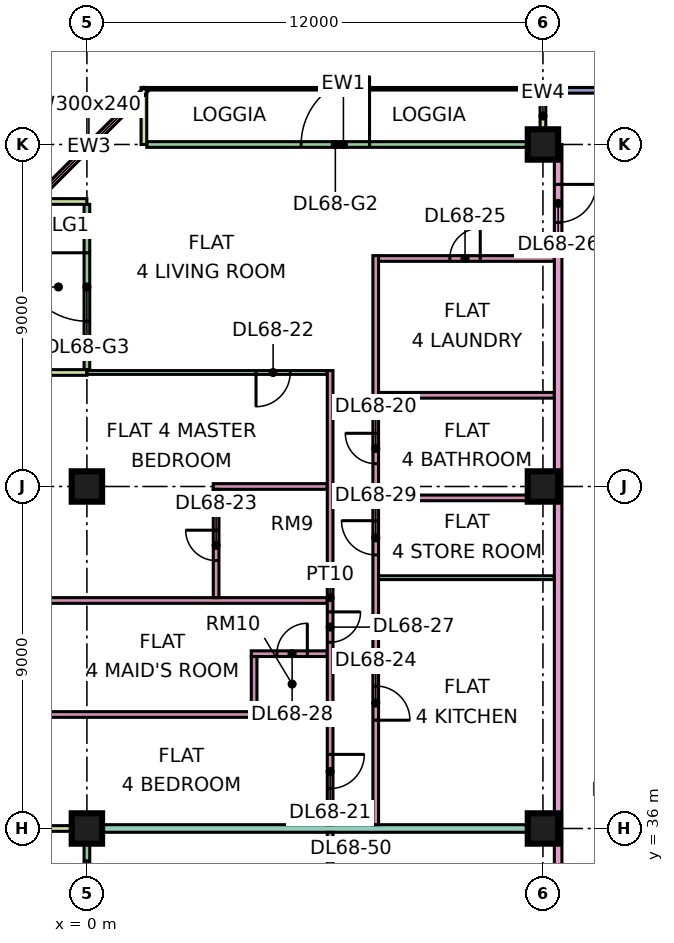
"""IFC4 building model, lengths in metres.
Left out: names, types, materials, properties, quantities, classifications, styles, units other than length and angle.
Written with IfcOpenShell. Run it as: python <this file> out.ifc"""

import sys

from ifc_helpers import new_model, si_unit, direction, frame, frame_2d, origin, origin_2d, place, context, subcontext, project, spatial, rectangle, extrude, element, fill, save


model = new_model("IFC4")
c1 = context("Model", 3, precision=1e-05, world=origin(), true_north=direction((0.0, 1.0)))
c2 = subcontext(c1, "Body", "Model", "MODEL_VIEW")
j1 = project(units=[si_unit("LENGTHUNIT", "METRE"), si_unit("PLANEANGLEUNIT", "RADIAN")], contexts=[c1])
p1 = place(None, origin())
s1 = spatial("IfcSite", under=j1, at=p1, CompositionType="ELEMENT")
p2 = place(p1, origin())
s2 = spatial("IfcBuilding", under=s1, at=p2, CompositionType="ELEMENT")
p3 = place(p2, frame((0.0, 0.0, 292.15)))
s3 = spatial("IfcBuildingStorey", under=s2, at=p3, CompositionType="ELEMENT", Elevation=292.15)
p4 = place(p3, frame((0.0, 36.0, 0.0), z_axis=(0.0, 0.0, 1.0), x_axis=(1.0, 0.0, 0.0)))
e1 = element("IfcColumn", 1, at=p4, inside=s3, PredefinedType="COLUMN", context=c2, shape_type="SweptSolid", body=[
    extrude(rectangle(XDim=0.8, YDim=0.8, at=origin_2d()), origin(), (0.0, 0.0, 1.0), 3.75),
])
for number, where, z_axis, x_axis in (
    (2, (0.0, 45.0, 0.0), (0.0, 0.0, 1.0), (1.0, 0.0, 0.0)),
    (3, (12.0, 36.0, 0.0), (0.0, 0.0, 1.0), (1.0, 0.0, 0.0)),
    (4, (12.0, 45.0, 0.0), (0.0, 0.0, 1.0), (1.0, 0.0, 0.0)),
    (5, (12.0, 54.0, 0.0), (0.0, 0.0, 1.0), (1.0, 0.0, 0.0)),
):
    element("IfcColumn", number, at=place(p3, frame(where, z_axis=z_axis, x_axis=x_axis)), inside=s3, PredefinedType="COLUMN", context=c2, shape_type="SweptSolid", body=[
        extrude(rectangle(XDim=0.8, YDim=0.8, at=origin_2d()), origin(), (0.0, 0.0, 1.0), 3.75),
    ])
p5 = place(p3, frame((22.5, 55.425, 0.0), z_axis=(0.0, 0.0, 1.0), x_axis=(-1.0, 0.0, 0.0)))
e6 = element("IfcWall", 6, at=p5, inside=s3, PredefinedType="SOLIDWALL", context=c2, shape_type="SweptSolid", body=[
    extrude(rectangle(XDim=10.425, YDim=0.15, at=frame_2d((5.212, 0.0))), origin(), (0.0, 0.0, 1.0), 3.35),
])
p6 = place(p5, frame((1.05, 0.0, 0.45)))
e7 = element("IfcOpeningElement", 7, at=p6, cuts=e6, PredefinedType="OPENING", context=c2, shape_type="SweptSolid", body=[
    extrude(rectangle(XDim=4.8, YDim=2.4, at=frame_2d((2.4, 1.2))), frame((0.0, 0.085, 0.0), z_axis=(0.0, -1.0, 0.0), x_axis=(1.0, 0.0, 0.0)), (0.0, 0.0, 1.0), 0.17),
])
p7 = place(p3, frame((11.925, 54.0, 0.0), z_axis=(0.0, 0.0, 1.0), x_axis=(-1.0, 0.0, 0.0)))
e8 = element("IfcWall", 8, at=p7, inside=s3, PredefinedType="SOLIDWALL", context=c2, shape_type="SweptSolid", body=[
    extrude(rectangle(XDim=10.35, YDim=0.15, at=frame_2d((5.175, 0.0))), origin(), (0.0, 0.0, 1.0), 3.35),
])
p8 = place(p7, frame((4.488, 0.0, 0.0)))
e9 = element("IfcOpeningElement", 9, at=p8, cuts=e8, PredefinedType="OPENING", context=c2, shape_type="SweptSolid", body=[
    extrude(rectangle(XDim=1.8, YDim=2.4, at=frame_2d((0.9, 1.2))), frame((0.0, 0.085, 0.0), z_axis=(0.0, -1.0, 0.0), x_axis=(1.0, 0.0, 0.0)), (0.0, 0.0, 1.0), 0.17),
])
for number, where, z_axis, x_axis in (
    (10, (12.0, 55.5, 0.0), (0.0, 0.0, 1.0), (0.0, -1.0, 0.0)),
    (11, (1.5, 55.5, 0.0), (0.0, 0.0, 1.0), (0.0, -1.0, 0.0)),
):
    element("IfcWall", number, at=place(p3, frame(where, z_axis=z_axis, x_axis=x_axis)), inside=s3, PredefinedType="SOLIDWALL", context=c2, shape_type="SweptSolid", body=[
        extrude(rectangle(XDim=1.5, YDim=0.15, at=frame_2d((0.75, 0.0))), origin(), (0.0, 0.0, 1.0), 3.35),
    ])
p9 = place(p3, frame((1.553, 55.447, 0.0), z_axis=(0.0, 0.0, 1.0), x_axis=(-0.707106781187, -0.707106781187, 0.0)))
e12 = element("IfcWall", 12, at=p9, inside=s3, PredefinedType="SOLIDWALL", context=c2, shape_type="SweptSolid", body=[
    extrude(rectangle(XDim=4.243, YDim=0.15, at=frame_2d((2.121, 0.0))), origin(), (0.0, 0.0, 1.0), 3.35),
])
p10 = place(p9, frame((0.621, 0.0, 0.45)))
e13 = element("IfcOpeningElement", 13, at=p10, cuts=e12, PredefinedType="OPENING", context=c2, shape_type="SweptSolid", body=[
    extrude(rectangle(XDim=3.0, YDim=2.4, at=frame_2d((1.5, 1.2))), frame((0.0, 0.085, 0.0), z_axis=(0.0, -1.0, 0.0), x_axis=(1.0, 0.0, 0.0)), (0.0, 0.0, 1.0), 0.17),
])
p11 = place(p3, frame((0.0, 52.425, 0.0), z_axis=(0.0, 0.0, 1.0), x_axis=(0.0, -1.0, 0.0)))
e14 = element("IfcWall", 14, at=p11, inside=s3, PredefinedType="SOLIDWALL", context=c2, shape_type="SweptSolid", body=[
    extrude(rectangle(XDim=4.35, YDim=0.15, at=frame_2d((2.175, 0.0))), origin(), (0.0, 0.0, 1.0), 3.35),
])
p12 = place(p11, frame((1.275, 0.0, 0.0)))
e15 = element("IfcOpeningElement", 15, at=p12, cuts=e14, PredefinedType="OPENING", context=c2, shape_type="SweptSolid", body=[
    extrude(rectangle(XDim=1.8, YDim=2.4, at=frame_2d((0.9, 1.2))), frame((0.0, 0.085, 0.0), z_axis=(0.0, -1.0, 0.0), x_axis=(1.0, 0.0, 0.0)), (0.0, 0.0, 1.0), 0.17),
])
for number, where, z_axis, x_axis in (
    (16, (-1.5, 52.5, 0.0), (0.0, 0.0, 1.0), (1.0, 0.0, 0.0)),
    (17, (-1.5, 48.0, 0.0), (0.0, 0.0, 1.0), (1.0, 0.0, 0.0)),
):
    element("IfcWall", number, at=place(p3, frame(where, z_axis=z_axis, x_axis=x_axis)), inside=s3, PredefinedType="SOLIDWALL", context=c2, shape_type="SweptSolid", body=[
        extrude(rectangle(XDim=1.5, YDim=0.15, at=frame_2d((0.75, 0.0))), origin(), (0.0, 0.0, 1.0), 3.35),
    ])
p13 = place(p3, frame((0.0, 35.925, 0.0), z_axis=(0.0, 0.0, 1.0), x_axis=(0.0, -1.0, 0.0)))
e18 = element("IfcWall", 18, at=p13, inside=s3, PredefinedType="SOLIDWALL", context=c2, shape_type="SweptSolid", body=[
    extrude(rectangle(XDim=11.85, YDim=0.15, at=frame_2d((5.925, 0.0))), origin(), (0.0, 0.0, 1.0), 3.35),
])
p14 = place(p13, frame((0.775, 0.0, 0.45)))
e19 = element("IfcOpeningElement", 19, at=p14, cuts=e18, PredefinedType="OPENING", context=c2, shape_type="SweptSolid", body=[
    extrude(rectangle(XDim=1.8, YDim=2.4, at=frame_2d((0.9, 1.2))), frame((0.0, 0.085, 0.0), z_axis=(0.0, -1.0, 0.0), x_axis=(1.0, 0.0, 0.0)), (0.0, 0.0, 1.0), 0.17),
])
p15 = place(p13, frame((5.025, 0.0, 0.0)))
e20 = element("IfcOpeningElement", 20, at=p15, cuts=e18, PredefinedType="OPENING", context=c2, shape_type="SweptSolid", body=[
    extrude(rectangle(XDim=1.8, YDim=2.4, at=frame_2d((0.9, 1.2))), frame((0.0, 0.085, 0.0), z_axis=(0.0, -1.0, 0.0), x_axis=(1.0, 0.0, 0.0)), (0.0, 0.0, 1.0), 0.17),
])
p16 = place(p13, frame((9.275, 0.0, 0.45)))
e21 = element("IfcOpeningElement", 21, at=p16, cuts=e18, PredefinedType="OPENING", context=c2, shape_type="SweptSolid", body=[
    extrude(rectangle(XDim=1.8, YDim=2.4, at=frame_2d((0.9, 1.2))), frame((0.0, 0.085, 0.0), z_axis=(0.0, -1.0, 0.0), x_axis=(1.0, 0.0, 0.0)), (0.0, 0.0, 1.0), 0.17),
])
p17 = place(p3, frame((-1.5, 36.0, 0.0), z_axis=(0.0, 0.0, 1.0), x_axis=(1.0, 0.0, 0.0)))
e22 = element("IfcWall", 22, at=p17, inside=s3, PredefinedType="SOLIDWALL", context=c2, shape_type="SweptSolid", body=[
    extrude(rectangle(XDim=1.5, YDim=0.15, at=frame_2d((0.75, 0.0))), origin(), (0.0, 0.0, 1.0), 3.35),
])
for number, where, z_axis, x_axis in (
    (23, (-1.351, 39.0, 0.0), (0.0, 0.0, 1.0), (1.0, 0.0, 0.0)),
    (24, (-1.351, 42.0, 0.0), (0.0, 0.0, 1.0), (1.0, 0.0, 0.0)),
):
    element("IfcWall", number, at=place(p3, frame(where, z_axis=z_axis, x_axis=x_axis)), inside=s3, PredefinedType="PARTITIONING", context=c2, shape_type="SweptSolid", body=[
        extrude(rectangle(XDim=7.676, YDim=0.15, at=frame_2d((3.838, 0.0))), origin(), (0.0, 0.0, 1.0), 3.35),
    ])
e25 = element("IfcWall", 25, at=p4, inside=s3, PredefinedType="PARTITIONING", context=c2, shape_type="SweptSolid", body=[
    extrude(rectangle(XDim=12.3, YDim=0.2, at=frame_2d((6.15, 0.0))), origin(), (0.0, 0.0, 1.0), 3.35),
])
p18 = place(p3, frame((0.0, 48.0, 0.0), z_axis=(0.0, 0.0, 1.0), x_axis=(1.0, 0.0, 0.0)))
e26 = element("IfcWall", 26, at=p18, inside=s3, PredefinedType="PARTITIONING", context=c2, shape_type="SweptSolid", body=[
    extrude(rectangle(XDim=6.325, YDim=0.1, at=frame_2d((3.163, 0.0))), origin(), (0.0, 0.0, 1.0), 3.35),
])
p19 = place(p18, frame((4.45, 0.0, 0.0)))
e27 = element("IfcOpeningElement", 27, at=p19, cuts=e26, PredefinedType="OPENING", context=c2, shape_type="SweptSolid", body=[
    extrude(rectangle(XDim=0.9, YDim=2.1, at=frame_2d((0.45, 1.05))), frame((0.0, 0.06, 0.0), z_axis=(0.0, -1.0, 0.0), x_axis=(1.0, 0.0, 0.0)), (0.0, 0.0, 1.0), 0.12),
])
p20 = place(p3, frame((3.325, 45.0, 0.0), z_axis=(0.0, 0.0, 1.0), x_axis=(1.0, 0.0, 0.0)))
e28 = element("IfcWall", 28, at=p20, inside=s3, PredefinedType="PARTITIONING", context=c2, shape_type="SweptSolid", body=[
    extrude(rectangle(XDim=3.0, YDim=0.15, at=frame_2d((1.5, 0.0))), origin(), (0.0, 0.0, 1.0), 3.35),
])
p21 = place(p3, frame((3.4, 42.075, 0.0), z_axis=(0.0, 0.0, 1.0), x_axis=(0.0, 1.0, 0.0)))
e29 = element("IfcWall", 29, at=p21, inside=s3, PredefinedType="PARTITIONING", context=c2, shape_type="SweptSolid", body=[
    extrude(rectangle(XDim=2.85, YDim=0.15, at=frame_2d((1.425, 0.0))), origin(), (0.0, 0.0, 1.0), 3.35),
])
p22 = place(p21, frame((0.975, 0.0, 0.0)))
e30 = element("IfcOpeningElement", 30, at=p22, cuts=e29, PredefinedType="OPENING", context=c2, shape_type="SweptSolid", body=[
    extrude(rectangle(XDim=0.8, YDim=2.1, at=frame_2d((0.4, 1.05))), frame((0.0, 0.085, 0.0), z_axis=(0.0, -1.0, 0.0), x_axis=(1.0, 0.0, 0.0)), (0.0, 0.0, 1.0), 0.17),
])
p23 = place(p3, frame((4.325, 40.6, 0.0), z_axis=(0.0, 0.0, 1.0), x_axis=(1.0, 0.0, 0.0)))
e31 = element("IfcWall", 31, at=p23, inside=s3, PredefinedType="PARTITIONING", context=c2, shape_type="SweptSolid", body=[
    extrude(rectangle(XDim=2.0, YDim=0.15, at=frame_2d((1.0, 0.0))), origin(), (0.0, 0.0, 1.0), 3.35),
])
p24 = place(p23, frame((0.675, 0.0, 0.0)))
e32 = element("IfcOpeningElement", 32, at=p24, cuts=e31, PredefinedType="OPENING", context=c2, shape_type="SweptSolid", body=[
    extrude(rectangle(XDim=0.8, YDim=2.1, at=frame_2d((0.4, 1.05))), frame((0.0, 0.085, 0.0), z_axis=(0.0, -1.0, 0.0), x_axis=(1.0, 0.0, 0.0)), (0.0, 0.0, 1.0), 0.17),
])
p25 = place(p3, frame((4.4, 39.075, 0.0), z_axis=(0.0, 0.0, 1.0), x_axis=(0.0, 1.0, 0.0)))
e33 = element("IfcWall", 33, at=p25, inside=s3, PredefinedType="PARTITIONING", context=c2, shape_type="SweptSolid", body=[
    extrude(rectangle(XDim=1.45, YDim=0.15, at=frame_2d((0.725, 0.0))), origin(), (0.0, 0.0, 1.0), 3.35),
])
p26 = place(p3, frame((6.4, 32.95, 0.0), z_axis=(0.0, 0.0, 1.0), x_axis=(0.0, 1.0, 0.0)))
e34 = element("IfcWall", 34, at=p26, inside=s3, PredefinedType="PARTITIONING", context=c2, shape_type="SweptSolid", body=[
    extrude(rectangle(XDim=2.95, YDim=0.15, at=frame_2d((1.475, 0.0))), origin(), (0.0, 0.0, 1.0), 3.35),
])
p27 = place(p26, frame((1.1, 0.0, 0.0)))
e35 = element("IfcOpeningElement", 35, at=p27, cuts=e34, PredefinedType="OPENING", context=c2, shape_type="SweptSolid", body=[
    extrude(rectangle(XDim=0.9, YDim=2.1, at=frame_2d((0.45, 1.05))), frame((0.0, 0.085, 0.0), z_axis=(0.0, -1.0, 0.0), x_axis=(1.0, 0.0, 0.0)), (0.0, 0.0, 1.0), 0.17),
])
p28 = place(p3, frame((6.4, 36.1, 0.0), z_axis=(0.0, 0.0, 1.0), x_axis=(0.0, 1.0, 0.0)))
e36 = element("IfcWall", 36, at=p28, inside=s3, PredefinedType="PARTITIONING", context=c2, shape_type="SweptSolid", body=[
    extrude(rectangle(XDim=11.95, YDim=0.15, at=frame_2d((5.975, 0.0))), origin(), (0.0, 0.0, 1.0), 3.35),
])
p29 = place(p28, frame((0.95, 0.0, 0.0)))
e37 = element("IfcOpeningElement", 37, at=p29, cuts=e36, PredefinedType="OPENING", context=c2, shape_type="SweptSolid", body=[
    extrude(rectangle(XDim=0.9, YDim=2.1, at=frame_2d((0.45, 1.05))), frame((0.0, 0.085, 0.0), z_axis=(0.0, -1.0, 0.0), x_axis=(1.0, 0.0, 0.0)), (0.0, 0.0, 1.0), 0.17),
])
p30 = place(p28, frame((4.8, 0.0, 0.0)))
e38 = element("IfcOpeningElement", 38, at=p30, cuts=e36, PredefinedType="OPENING", context=c2, shape_type="SweptSolid", body=[
    extrude(rectangle(XDim=0.8, YDim=2.1, at=frame_2d((0.4, 1.05))), frame((0.0, 0.085, 0.0), z_axis=(0.0, -1.0, 0.0), x_axis=(1.0, 0.0, 0.0)), (0.0, 0.0, 1.0), 0.17),
])
p31 = place(p3, frame((7.6, 36.1, 0.0), z_axis=(0.0, 0.0, 1.0), x_axis=(0.0, 1.0, 0.0)))
e39 = element("IfcWall", 39, at=p31, inside=s3, PredefinedType="PARTITIONING", context=c2, shape_type="SweptSolid", body=[
    extrude(rectangle(XDim=14.975, YDim=0.15, at=frame_2d((7.487, 0.0))), origin(), (0.0, 0.0, 1.0), 3.35),
])
p32 = place(p31, frame((9.5, 0.0, 0.0)))
e40 = element("IfcOpeningElement", 40, at=p32, cuts=e39, PredefinedType="OPENING", context=c2, shape_type="SweptSolid", body=[
    extrude(rectangle(XDim=0.8, YDim=2.1, at=frame_2d((0.4, 1.05))), frame((0.0, 0.085, 0.0), z_axis=(0.0, -1.0, 0.0), x_axis=(1.0, 0.0, 0.0)), (0.0, 0.0, 1.0), 0.17),
])
p33 = place(p31, frame((2.75, 0.0, 0.0)))
e41 = element("IfcOpeningElement", 41, at=p33, cuts=e39, PredefinedType="OPENING", context=c2, shape_type="SweptSolid", body=[
    extrude(rectangle(XDim=0.9, YDim=2.1, at=frame_2d((0.45, 1.05))), frame((0.0, 0.085, 0.0), z_axis=(0.0, -1.0, 0.0), x_axis=(1.0, 0.0, 0.0)), (0.0, 0.0, 1.0), 0.17),
])
p34 = place(p31, frame((7.1, 0.0, 0.0)))
e42 = element("IfcOpeningElement", 42, at=p34, cuts=e39, PredefinedType="OPENING", context=c2, shape_type="SweptSolid", body=[
    extrude(rectangle(XDim=0.9, YDim=2.1, at=frame_2d((0.45, 1.05))), frame((0.0, 0.085, 0.0), z_axis=(0.0, -1.0, 0.0), x_axis=(1.0, 0.0, 0.0)), (0.0, 0.0, 1.0), 0.17),
])
p35 = place(p3, frame((7.675, 42.6, 0.0), z_axis=(0.0, 0.0, 1.0), x_axis=(1.0, 0.0, 0.0)))
e43 = element("IfcWall", 43, at=p35, inside=s3, PredefinedType="PARTITIONING", context=c2, shape_type="SweptSolid", body=[
    extrude(rectangle(XDim=4.625, YDim=0.1, at=frame_2d((2.312, 0.0))), origin(), (0.0, 0.0, 1.0), 3.35),
])
for number, where, z_axis, x_axis in (
    (44, (7.675, 44.7, 0.0), (0.0, 0.0, 1.0), (1.0, 0.0, 0.0)),
    (45, (7.675, 47.4, 0.0), (0.0, 0.0, 1.0), (1.0, 0.0, 0.0)),
):
    element("IfcWall", number, at=place(p3, frame(where, z_axis=z_axis, x_axis=x_axis)), inside=s3, PredefinedType="PARTITIONING", context=c2, shape_type="SweptSolid", body=[
        extrude(rectangle(XDim=4.625, YDim=0.15, at=frame_2d((2.312, 0.0))), origin(), (0.0, 0.0, 1.0), 3.35),
    ])
p36 = place(p3, frame((7.675, 51.0, 0.0), z_axis=(0.0, 0.0, 1.0), x_axis=(1.0, 0.0, 0.0)))
e46 = element("IfcWall", 46, at=p36, inside=s3, PredefinedType="PARTITIONING", context=c2, shape_type="SweptSolid", body=[
    extrude(rectangle(XDim=4.625, YDim=0.15, at=frame_2d((2.312, 0.0))), origin(), (0.0, 0.0, 1.0), 3.35),
])
p37 = place(p36, frame((1.875, 0.0, 0.0)))
e47 = element("IfcOpeningElement", 47, at=p37, cuts=e46, PredefinedType="OPENING", context=c2, shape_type="SweptSolid", body=[
    extrude(rectangle(XDim=0.8, YDim=2.1, at=frame_2d((0.4, 1.05))), frame((0.0, 0.085, 0.0), z_axis=(0.0, -1.0, 0.0), x_axis=(1.0, 0.0, 0.0)), (0.0, 0.0, 1.0), 0.17),
])
p38 = place(p3, frame((12.4, 20.0, 0.0), z_axis=(0.0, 0.0, 1.0), x_axis=(0.0, 1.0, 0.0)))
e48 = element("IfcWall", 48, at=p38, inside=s3, PredefinedType="PARTITIONING", context=c2, shape_type="SweptSolid", body=[
    extrude(rectangle(XDim=34.0, YDim=0.2, at=frame_2d((17.0, 0.0))), origin(), (0.0, 0.0, 1.0), 3.35),
])
p39 = place(p38, frame((31.95, 0.0, 0.0)))
e49 = element("IfcOpeningElement", 49, at=p39, cuts=e48, PredefinedType="OPENING", context=c2, shape_type="SweptSolid", body=[
    extrude(rectangle(XDim=1.0, YDim=2.1, at=frame_2d((0.5, 1.05))), frame((0.0, 0.11, 0.0), z_axis=(0.0, -1.0, 0.0), x_axis=(1.0, 0.0, 0.0)), (0.0, 0.0, 1.0), 0.22),
])
p40 = place(p38, frame((0.6, 0.0, 0.0)))
e50 = element("IfcOpeningElement", 50, at=p40, cuts=e48, PredefinedType="OPENING", context=c2, shape_type="SweptSolid", body=[
    extrude(rectangle(XDim=1.2, YDim=2.1, at=frame_2d((0.6, 1.05))), frame((0.0, 0.11, 0.0), z_axis=(0.0, -1.0, 0.0), x_axis=(1.0, 0.0, 0.0)), (0.0, 0.0, 1.0), 0.22),
])
p41 = place(p38, frame((13.8, 0.0, 0.0)))
e51 = element("IfcOpeningElement", 51, at=p41, cuts=e48, PredefinedType="OPENING", context=c2, shape_type="SweptSolid", body=[
    extrude(rectangle(XDim=1.0, YDim=2.1, at=frame_2d((0.5, 1.05))), frame((0.0, 0.11, 0.0), z_axis=(0.0, -1.0, 0.0), x_axis=(1.0, 0.0, 0.0)), (0.0, 0.0, 1.0), 0.22),
])
p42 = place(p8, frame((1.8, 0.0, 0.0), z_axis=(0.0, 0.0, 1.0), x_axis=(-1.0, 0.0, 0.0)))
e52 = element("IfcDoor", 52, at=p42, inside=s3, OperationType="DOUBLE_DOOR_SINGLE_SWING", PredefinedType="DOOR", context=c2, shape_type="SweptSolid", body=[
    extrude(rectangle(XDim=1.8, YDim=2.4, at=frame_2d((0.9, 1.2))), frame((0.0, 0.025, 0.0), z_axis=(0.0, -1.0, 0.0), x_axis=(1.0, 0.0, 0.0)), (0.0, 0.0, 1.0), 0.05),
])
fill(e9, e52)
p43 = place(p10, origin())
e53 = element("IfcWindow", 53, at=p43, inside=s3, PartitioningType="SINGLE_PANEL", PredefinedType="WINDOW", context=c2, shape_type="SweptSolid", body=[
    extrude(rectangle(XDim=3.0, YDim=2.4, at=frame_2d((1.5, 1.2))), frame((0.0, 0.03, 0.0), z_axis=(0.0, -1.0, 0.0), x_axis=(1.0, 0.0, 0.0)), (0.0, 0.0, 1.0), 0.06),
])
fill(e13, e53)
p44 = place(p12, frame((1.8, 0.0, 0.0), z_axis=(0.0, 0.0, 1.0), x_axis=(-1.0, 0.0, 0.0)))
e54 = element("IfcDoor", 54, at=p44, inside=s3, OperationType="DOUBLE_DOOR_SINGLE_SWING", PredefinedType="DOOR", context=c2, shape_type="SweptSolid", body=[
    extrude(rectangle(XDim=1.8, YDim=2.4, at=frame_2d((0.9, 1.2))), frame((0.0, 0.025, 0.0), z_axis=(0.0, -1.0, 0.0), x_axis=(1.0, 0.0, 0.0)), (0.0, 0.0, 1.0), 0.05),
])
fill(e15, e54)
p45 = place(p14, origin())
e55 = element("IfcWindow", 55, at=p45, inside=s3, PartitioningType="SINGLE_PANEL", PredefinedType="WINDOW", context=c2, shape_type="SweptSolid", body=[
    extrude(rectangle(XDim=1.8, YDim=2.4, at=frame_2d((0.9, 1.2))), frame((0.0, 0.03, 0.0), z_axis=(0.0, -1.0, 0.0), x_axis=(1.0, 0.0, 0.0)), (0.0, 0.0, 1.0), 0.06),
])
fill(e19, e55)
p46 = place(p32, frame((0.8, 0.0, 0.0), z_axis=(0.0, 0.0, 1.0), x_axis=(-1.0, 0.0, 0.0)))
e56 = element("IfcDoor", 56, at=p46, inside=s3, OperationType="SINGLE_SWING_RIGHT", PredefinedType="DOOR", context=c2, shape_type="SweptSolid", body=[
    extrude(rectangle(XDim=0.8, YDim=2.1, at=frame_2d((0.4, 1.05))), frame((0.0, 0.025, 0.0), z_axis=(0.0, -1.0, 0.0), x_axis=(1.0, 0.0, 0.0)), (0.0, 0.0, 1.0), 0.05),
])
fill(e40, e56)
p47 = place(p29, origin())
e57 = element("IfcDoor", 57, at=p47, inside=s3, OperationType="SINGLE_SWING_RIGHT", PredefinedType="DOOR", context=c2, shape_type="SweptSolid", body=[
    extrude(rectangle(XDim=0.9, YDim=2.1, at=frame_2d((0.45, 1.05))), frame((0.0, 0.025, 0.0), z_axis=(0.0, -1.0, 0.0), x_axis=(1.0, 0.0, 0.0)), (0.0, 0.0, 1.0), 0.05),
])
fill(e37, e57)
p48 = place(p19, frame((0.9, 0.0, 0.0), z_axis=(0.0, 0.0, 1.0), x_axis=(-1.0, 0.0, 0.0)))
e58 = element("IfcDoor", 58, at=p48, inside=s3, OperationType="SINGLE_SWING_LEFT", PredefinedType="DOOR", context=c2, shape_type="SweptSolid", body=[
    extrude(rectangle(XDim=0.9, YDim=2.1, at=frame_2d((0.45, 1.05))), frame((0.0, 0.025, 0.0), z_axis=(0.0, -1.0, 0.0), x_axis=(1.0, 0.0, 0.0)), (0.0, 0.0, 1.0), 0.05),
])
fill(e27, e58)
p49 = place(p22, frame((0.8, 0.0, 0.0), z_axis=(0.0, 0.0, 1.0), x_axis=(-1.0, 0.0, 0.0)))
e59 = element("IfcDoor", 59, at=p49, inside=s3, OperationType="SINGLE_SWING_RIGHT", PredefinedType="DOOR", context=c2, shape_type="SweptSolid", body=[
    extrude(rectangle(XDim=0.8, YDim=2.1, at=frame_2d((0.4, 1.05))), frame((0.0, 0.025, 0.0), z_axis=(0.0, -1.0, 0.0), x_axis=(1.0, 0.0, 0.0)), (0.0, 0.0, 1.0), 0.05),
])
fill(e30, e59)
p50 = place(p33, frame((0.9, 0.0, 0.0), z_axis=(0.0, 0.0, 1.0), x_axis=(-1.0, 0.0, 0.0)))
e60 = element("IfcDoor", 60, at=p50, inside=s3, OperationType="SINGLE_SWING_LEFT", PredefinedType="DOOR", context=c2, shape_type="SweptSolid", body=[
    extrude(rectangle(XDim=0.9, YDim=2.1, at=frame_2d((0.45, 1.05))), frame((0.0, 0.025, 0.0), z_axis=(0.0, -1.0, 0.0), x_axis=(1.0, 0.0, 0.0)), (0.0, 0.0, 1.0), 0.05),
])
fill(e41, e60)
p51 = place(p37, frame((0.8, 0.0, 0.0), z_axis=(0.0, 0.0, 1.0), x_axis=(-1.0, 0.0, 0.0)))
e61 = element("IfcDoor", 61, at=p51, inside=s3, OperationType="SINGLE_SWING_RIGHT", PredefinedType="DOOR", context=c2, shape_type="SweptSolid", body=[
    extrude(rectangle(XDim=0.8, YDim=2.1, at=frame_2d((0.4, 1.05))), frame((0.0, 0.025, 0.0), z_axis=(0.0, -1.0, 0.0), x_axis=(1.0, 0.0, 0.0)), (0.0, 0.0, 1.0), 0.05),
])
fill(e47, e61)
p52 = place(p39, origin())
e62 = element("IfcDoor", 62, at=p52, inside=s3, OperationType="SINGLE_SWING_RIGHT", PredefinedType="DOOR", context=c2, shape_type="SweptSolid", body=[
    extrude(rectangle(XDim=1.0, YDim=2.1, at=frame_2d((0.5, 1.05))), frame((0.0, 0.025, 0.0), z_axis=(0.0, -1.0, 0.0), x_axis=(1.0, 0.0, 0.0)), (0.0, 0.0, 1.0), 0.05),
])
fill(e49, e62)
p53 = place(p30, origin())
e63 = element("IfcDoor", 63, at=p53, inside=s3, OperationType="SINGLE_SWING_RIGHT", PredefinedType="DOOR", context=c2, shape_type="SweptSolid", body=[
    extrude(rectangle(XDim=0.8, YDim=2.1, at=frame_2d((0.4, 1.05))), frame((0.0, 0.025, 0.0), z_axis=(0.0, -1.0, 0.0), x_axis=(1.0, 0.0, 0.0)), (0.0, 0.0, 1.0), 0.05),
])
fill(e38, e63)
p54 = place(p24, frame((0.8, 0.0, 0.0), z_axis=(0.0, 0.0, 1.0), x_axis=(-1.0, 0.0, 0.0)))
e64 = element("IfcDoor", 64, at=p54, inside=s3, OperationType="SINGLE_SWING_RIGHT", PredefinedType="DOOR", context=c2, shape_type="SweptSolid", body=[
    extrude(rectangle(XDim=0.8, YDim=2.1, at=frame_2d((0.4, 1.05))), frame((0.0, 0.025, 0.0), z_axis=(0.0, -1.0, 0.0), x_axis=(1.0, 0.0, 0.0)), (0.0, 0.0, 1.0), 0.05),
])
fill(e32, e64)
p55 = place(p34, frame((0.9, 0.0, 0.0), z_axis=(0.0, 0.0, 1.0), x_axis=(-1.0, 0.0, 0.0)))
e65 = element("IfcDoor", 65, at=p55, inside=s3, OperationType="SINGLE_SWING_RIGHT", PredefinedType="DOOR", context=c2, shape_type="SweptSolid", body=[
    extrude(rectangle(XDim=0.9, YDim=2.1, at=frame_2d((0.45, 1.05))), frame((0.0, 0.025, 0.0), z_axis=(0.0, -1.0, 0.0), x_axis=(1.0, 0.0, 0.0)), (0.0, 0.0, 1.0), 0.05),
])
fill(e42, e65)
save(model, sys.argv[1])
